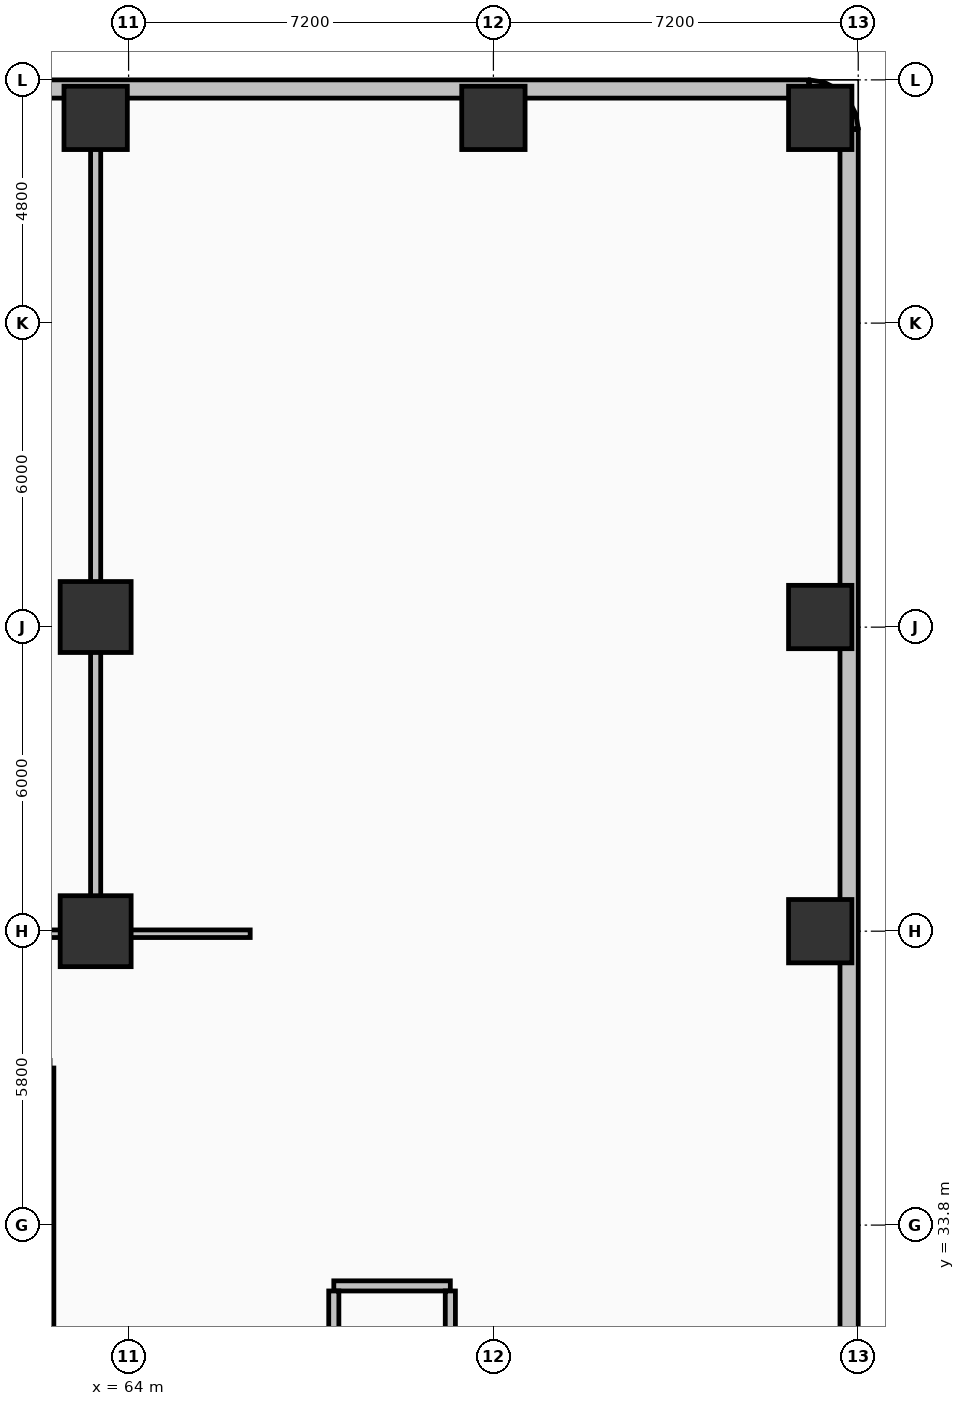
"""IFC4 building model, lengths in metres.
Left out: names, types, materials, properties, quantities, classifications, styles, units other than length and angle.
Written with IfcOpenShell. Run it as: python <this file> out.ifc"""

import sys

from ifc_helpers import new_model, si_unit, direction, frame, frame_2d, origin, origin_2d, place, context, subcontext, project, spatial, rectangle, extrude, element, fill, save


model = new_model("IFC4")
c1 = context("Model", 3, precision=1e-05, world=origin(), true_north=direction((0.0, 1.0)))
c2 = subcontext(c1, "Body", "Model", "MODEL_VIEW")
j1 = project(units=[si_unit("LENGTHUNIT", "METRE"), si_unit("PLANEANGLEUNIT", "RADIAN")], contexts=[c1])
p1 = place(None, origin())
s1 = spatial("IfcSite", under=j1, at=p1, CompositionType="ELEMENT")
p2 = place(p1, origin())
s2 = spatial("IfcBuilding", under=s1, at=p2, CompositionType="ELEMENT")
p3 = place(p2, frame((0.0, 0.0, 11.1)))
s3 = spatial("IfcBuildingStorey", under=s2, at=p3, CompositionType="ELEMENT", Elevation=11.1)
for number, where, z_axis, x_axis in (
    (1, (63.35, 55.65, 0.0), (0.0, 0.0, 1.0), (1.0, 0.0, 0.0)),
    (2, (71.2, 55.65, 0.0), (0.0, 0.0, 1.0), (1.0, 0.0, 0.0)),
    (3, (77.65, 39.6, 0.0), (0.0, 0.0, 1.0), (1.0, 0.0, 0.0)),
    (4, (77.65, 45.8, 0.0), (0.0, 0.0, 1.0), (1.0, 0.0, 0.0)),
    (5, (77.65, 55.65, 0.0), (0.0, 0.0, 1.0), (1.0, 0.0, 0.0)),
):
    element("IfcColumn", number, at=place(p3, frame(where, z_axis=z_axis, x_axis=x_axis)), inside=s3, PredefinedType="COLUMN", context=c2, shape_type="SweptSolid", body=[
        extrude(rectangle(XDim=1.25, YDim=1.25, at=origin_2d()), origin(), (0.0, 0.0, 1.0), 4.5),
    ])
for number, where, z_axis, x_axis in (
    (6, (63.35, 39.6, 0.0), (0.0, 0.0, 1.0), (1.0, 0.0, 0.0)),
    (7, (63.35, 45.8, 0.0), (0.0, 0.0, 1.0), (1.0, 0.0, 0.0)),
):
    element("IfcColumn", number, at=place(p3, frame(where, z_axis=z_axis, x_axis=x_axis)), inside=s3, PredefinedType="COLUMN", context=c2, shape_type="SweptSolid", body=[
        extrude(rectangle(XDim=1.4, YDim=1.4, at=origin_2d()), origin(), (0.0, 0.0, 1.0), 4.5),
    ])
p4 = place(p3, frame((78.22, 0.98, 0.0), z_axis=(0.0, 0.0, 1.0), x_axis=(0.0, 1.0, 0.0)))
e8 = element("IfcWall", 8, at=p4, inside=s3, PredefinedType="SOLIDWALL", context=c2, shape_type="SweptSolid", body=[
    extrude(rectangle(XDim=54.44, YDim=0.36, at=frame_2d((27.22, 0.0))), origin(), (0.0, 0.0, 1.0), 3.48),
])
p5 = place(p4, frame((1.411, 0.0, 0.9)))
e9 = element("IfcOpeningElement", 9, at=p5, cuts=e8, PredefinedType="OPENING", context=c2, shape_type="SweptSolid", body=[
    extrude(rectangle(XDim=1.8, YDim=2.1, at=frame_2d((0.9, 1.05))), frame((0.0, 0.19, 0.0), z_axis=(0.0, -1.0, 0.0), x_axis=(1.0, 0.0, 0.0)), (0.0, 0.0, 1.0), 0.38),
])
p6 = place(p4, frame((4.732, 0.0, 0.9)))
e10 = element("IfcOpeningElement", 10, at=p6, cuts=e8, PredefinedType="OPENING", context=c2, shape_type="SweptSolid", body=[
    extrude(rectangle(XDim=1.8, YDim=2.1, at=frame_2d((0.9, 1.05))), frame((0.0, 0.19, 0.0), z_axis=(0.0, -1.0, 0.0), x_axis=(1.0, 0.0, 0.0)), (0.0, 0.0, 1.0), 0.38),
])
p7 = place(p4, frame((11.375, 0.0, 0.9)))
e11 = element("IfcOpeningElement", 11, at=p7, cuts=e8, PredefinedType="OPENING", context=c2, shape_type="SweptSolid", body=[
    extrude(rectangle(XDim=1.8, YDim=2.1, at=frame_2d((0.9, 1.05))), frame((0.0, 0.19, 0.0), z_axis=(0.0, -1.0, 0.0), x_axis=(1.0, 0.0, 0.0)), (0.0, 0.0, 1.0), 0.38),
])
p8 = place(p4, frame((18.017, 0.0, 0.9)))
e12 = element("IfcOpeningElement", 12, at=p8, cuts=e8, PredefinedType="OPENING", context=c2, shape_type="SweptSolid", body=[
    extrude(rectangle(XDim=1.8, YDim=2.1, at=frame_2d((0.9, 1.05))), frame((0.0, 0.19, 0.0), z_axis=(0.0, -1.0, 0.0), x_axis=(1.0, 0.0, 0.0)), (0.0, 0.0, 1.0), 0.38),
])
p9 = place(p4, frame((21.338, 0.0, 0.9)))
e13 = element("IfcOpeningElement", 13, at=p9, cuts=e8, PredefinedType="OPENING", context=c2, shape_type="SweptSolid", body=[
    extrude(rectangle(XDim=1.8, YDim=2.1, at=frame_2d((0.9, 1.05))), frame((0.0, 0.19, 0.0), z_axis=(0.0, -1.0, 0.0), x_axis=(1.0, 0.0, 0.0)), (0.0, 0.0, 1.0), 0.38),
])
p10 = place(p4, frame((23.959, 0.0, 0.9)))
e14 = element("IfcOpeningElement", 14, at=p10, cuts=e8, PredefinedType="OPENING", context=c2, shape_type="SweptSolid", body=[
    extrude(rectangle(XDim=1.8, YDim=2.1, at=frame_2d((0.9, 1.05))), frame((0.0, 0.19, 0.0), z_axis=(0.0, -1.0, 0.0), x_axis=(1.0, 0.0, 0.0)), (0.0, 0.0, 1.0), 0.38),
])
p11 = place(p4, frame((28.681, 0.0, 0.9)))
e15 = element("IfcOpeningElement", 15, at=p11, cuts=e8, PredefinedType="OPENING", context=c2, shape_type="SweptSolid", body=[
    extrude(rectangle(XDim=1.8, YDim=2.1, at=frame_2d((0.9, 1.05))), frame((0.0, 0.19, 0.0), z_axis=(0.0, -1.0, 0.0), x_axis=(1.0, 0.0, 0.0)), (0.0, 0.0, 1.0), 0.38),
])
p12 = place(p4, frame((31.302, 0.0, 0.9)))
e16 = element("IfcOpeningElement", 16, at=p12, cuts=e8, PredefinedType="OPENING", context=c2, shape_type="SweptSolid", body=[
    extrude(rectangle(XDim=1.8, YDim=2.1, at=frame_2d((0.9, 1.05))), frame((0.0, 0.19, 0.0), z_axis=(0.0, -1.0, 0.0), x_axis=(1.0, 0.0, 0.0)), (0.0, 0.0, 1.0), 0.38),
])
p13 = place(p4, frame((34.623, 0.0, 0.9)))
e17 = element("IfcOpeningElement", 17, at=p13, cuts=e8, PredefinedType="OPENING", context=c2, shape_type="SweptSolid", body=[
    extrude(rectangle(XDim=1.8, YDim=2.1, at=frame_2d((0.9, 1.05))), frame((0.0, 0.19, 0.0), z_axis=(0.0, -1.0, 0.0), x_axis=(1.0, 0.0, 0.0)), (0.0, 0.0, 1.0), 0.38),
])
p14 = place(p4, frame((41.266, 0.0, 0.9)))
e18 = element("IfcOpeningElement", 18, at=p14, cuts=e8, PredefinedType="OPENING", context=c2, shape_type="SweptSolid", body=[
    extrude(rectangle(XDim=1.8, YDim=2.1, at=frame_2d((0.9, 1.05))), frame((0.0, 0.19, 0.0), z_axis=(0.0, -1.0, 0.0), x_axis=(1.0, 0.0, 0.0)), (0.0, 0.0, 1.0), 0.38),
])
p15 = place(p4, frame((47.908, 0.0, 0.9)))
e19 = element("IfcOpeningElement", 19, at=p15, cuts=e8, PredefinedType="OPENING", context=c2, shape_type="SweptSolid", body=[
    extrude(rectangle(XDim=1.8, YDim=2.1, at=frame_2d((0.9, 1.05))), frame((0.0, 0.19, 0.0), z_axis=(0.0, -1.0, 0.0), x_axis=(1.0, 0.0, 0.0)), (0.0, 0.0, 1.0), 0.38),
])
p16 = place(p4, frame((51.229, 0.0, 0.9)))
e20 = element("IfcOpeningElement", 20, at=p16, cuts=e8, PredefinedType="OPENING", context=c2, shape_type="SweptSolid", body=[
    extrude(rectangle(XDim=1.8, YDim=2.1, at=frame_2d((0.9, 1.05))), frame((0.0, 0.19, 0.0), z_axis=(0.0, -1.0, 0.0), x_axis=(1.0, 0.0, 0.0)), (0.0, 0.0, 1.0), 0.38),
])
p17 = place(p3, frame((78.22, 55.42, 0.0), z_axis=(0.0, 0.0, 1.0), x_axis=(-0.156012644899, 0.987755058014, 0.0)))
e21 = element("IfcWall", 21, at=p17, inside=s3, PredefinedType="SOLIDWALL", context=c2, shape_type="SweptSolid", body=[
    extrude(rectangle(XDim=0.25, YDim=0.36, at=frame_2d((0.125, 0.0))), origin(), (0.0, 0.0, 1.0), 3.48),
])
for number, where, z_axis, x_axis in (
    (22, (78.181, 55.667, 0.0), (0.0, 0.0, 1.0), (-0.455, 0.891, 0.0)),
    (23, (78.067, 55.89, 0.0), (0.0, 0.0, 1.0), (-0.707, 0.707, 0.0)),
    (24, (77.89, 56.067, 0.0), (0.0, 0.0, 1.0), (-0.891, 0.455, 0.0)),
):
    element("IfcWall", number, at=place(p3, frame(where, z_axis=z_axis, x_axis=x_axis)), inside=s3, PredefinedType="SOLIDWALL", context=c2, shape_type="SweptSolid", body=[
        extrude(rectangle(XDim=0.25, YDim=0.36, at=frame_2d((0.125, 0.0))), origin(), (0.0, 0.0, 1.0), 3.48),
    ])
p18 = place(p3, frame((77.667, 56.181, 0.0), z_axis=(0.0, 0.0, 1.0), x_axis=(-0.987755058014, 0.156012644899, 0.0)))
e25 = element("IfcWall", 25, at=p18, inside=s3, PredefinedType="SOLIDWALL", context=c2, shape_type="SweptSolid", body=[
    extrude(rectangle(XDim=0.25, YDim=0.36, at=frame_2d((0.125, 0.0))), origin(), (0.0, 0.0, 1.0), 3.48),
])
p19 = place(p3, frame((77.42, 56.22, 0.0), z_axis=(0.0, 0.0, 1.0), x_axis=(-1.0, 0.0, 0.0)))
e26 = element("IfcWall", 26, at=p19, inside=s3, PredefinedType="SOLIDWALL", context=c2, shape_type="SweptSolid", body=[
    extrude(rectangle(XDim=15.25, YDim=0.36, at=frame_2d((7.625, 0.0))), origin(), (0.0, 0.0, 1.0), 3.48),
])
p20 = place(p19, frame((1.494, 0.0, 0.9)))
e27 = element("IfcOpeningElement", 27, at=p20, cuts=e26, PredefinedType="OPENING", context=c2, shape_type="SweptSolid", body=[
    extrude(rectangle(XDim=1.8, YDim=2.1, at=frame_2d((0.9, 1.05))), frame((0.0, 0.19, 0.0), z_axis=(0.0, -1.0, 0.0), x_axis=(1.0, 0.0, 0.0)), (0.0, 0.0, 1.0), 0.38),
])
p21 = place(p19, frame((8.469, 0.0, 0.9)))
e28 = element("IfcOpeningElement", 28, at=p21, cuts=e26, PredefinedType="OPENING", context=c2, shape_type="SweptSolid", body=[
    extrude(rectangle(XDim=1.8, YDim=2.1, at=frame_2d((0.9, 1.05))), frame((0.0, 0.19, 0.0), z_axis=(0.0, -1.0, 0.0), x_axis=(1.0, 0.0, 0.0)), (0.0, 0.0, 1.0), 0.38),
])
p22 = place(p19, frame((10.906, 0.0, 0.9)))
e29 = element("IfcOpeningElement", 29, at=p22, cuts=e26, PredefinedType="OPENING", context=c2, shape_type="SweptSolid", body=[
    extrude(rectangle(XDim=1.8, YDim=2.1, at=frame_2d((0.9, 1.05))), frame((0.0, 0.19, 0.0), z_axis=(0.0, -1.0, 0.0), x_axis=(1.0, 0.0, 0.0)), (0.0, 0.0, 1.0), 0.38),
])
p23 = place(p3, frame((68.05, 32.6, 0.0), z_axis=(0.0, 0.0, 1.0), x_axis=(1.0, 0.0, 0.0)))
e30 = element("IfcWall", 30, at=p23, inside=s3, PredefinedType="PARTITIONING", context=c2, shape_type="SweptSolid", body=[
    extrude(rectangle(XDim=2.3, YDim=0.2, at=frame_2d((1.15, 0.0))), origin(), (0.0, 0.0, 1.0), 3.42),
])
for number, where, z_axis, x_axis in (
    (31, (68.05, 29.9, 0.0), (0.0, 0.0, 1.0), (0.0, 1.0, 0.0)),
    (32, (70.35, 29.9, 0.0), (0.0, 0.0, 1.0), (0.0, 1.0, 0.0)),
):
    element("IfcWall", number, at=place(p3, frame(where, z_axis=z_axis, x_axis=x_axis)), inside=s3, PredefinedType="PARTITIONING", context=c2, shape_type="SweptSolid", body=[
        extrude(rectangle(XDim=2.6, YDim=0.2, at=frame_2d((1.3, 0.0))), origin(), (0.0, 0.0, 1.0), 3.42),
    ])
p24 = place(p3, frame((62.45, 19.5, 0.0), z_axis=(0.0, 0.0, 1.0), x_axis=(0.0, 1.0, 0.0)))
e33 = element("IfcWall", 33, at=p24, inside=s3, PredefinedType="PARTITIONING", context=c2, shape_type="SweptSolid", body=[
    extrude(rectangle(XDim=17.4, YDim=0.15, at=frame_2d((8.7, 0.0))), origin(), (0.0, 0.0, 1.0), 3.42),
])
p25 = place(p3, frame((63.35, 39.6, 0.0), z_axis=(0.0, 0.0, 1.0), x_axis=(0.0, 1.0, 0.0)))
e34 = element("IfcWall", 34, at=p25, inside=s3, PredefinedType="PARTITIONING", context=c2, shape_type="SweptSolid", body=[
    extrude(rectangle(XDim=16.4, YDim=0.2, at=frame_2d((8.2, 0.0))), origin(), (0.0, 0.0, 1.0), 3.42),
])
p26 = place(p25, frame((3.4, 0.0, 0.0)))
e35 = element("IfcOpeningElement", 35, at=p26, cuts=e34, PredefinedType="OPENING", context=c2, shape_type="SweptSolid", body=[
    extrude(rectangle(XDim=1.0, YDim=2.15, at=frame_2d((0.5, 1.075))), frame((0.0, 0.11, 0.0), z_axis=(0.0, -1.0, 0.0), x_axis=(1.0, 0.0, 0.0)), (0.0, 0.0, 1.0), 0.22),
])
p27 = place(p3, frame((66.4, 39.55, 0.0), z_axis=(0.0, 0.0, 1.0), x_axis=(-1.0, 0.0, 0.0)))
e36 = element("IfcWall", 36, at=p27, inside=s3, PredefinedType="PARTITIONING", context=c2, shape_type="SweptSolid", body=[
    extrude(rectangle(XDim=13.25, YDim=0.15, at=frame_2d((6.625, 0.0))), origin(), (0.0, 0.0, 1.0), 3.42),
])
p28 = place(p27, frame((5.5, 0.0, 0.0)))
e37 = element("IfcOpeningElement", 37, at=p28, cuts=e36, PredefinedType="OPENING", context=c2, shape_type="SweptSolid", body=[
    extrude(rectangle(XDim=1.0, YDim=2.15, at=frame_2d((0.5, 1.075))), frame((0.0, 0.085, 0.0), z_axis=(0.0, -1.0, 0.0), x_axis=(1.0, 0.0, 0.0)), (0.0, 0.0, 1.0), 0.17),
])
p29 = place(p12, origin())
e38 = element("IfcWindow", 38, at=p29, inside=s3, PartitioningType="SINGLE_PANEL", PredefinedType="WINDOW", context=c2, shape_type="SweptSolid", body=[
    extrude(rectangle(XDim=1.8, YDim=2.1, at=frame_2d((0.9, 1.05))), frame((0.0, 0.03, 0.0), z_axis=(0.0, -1.0, 0.0), x_axis=(1.0, 0.0, 0.0)), (0.0, 0.0, 1.0), 0.06),
])
fill(e16, e38)
p30 = place(p13, origin())
e39 = element("IfcWindow", 39, at=p30, inside=s3, PartitioningType="SINGLE_PANEL", PredefinedType="WINDOW", context=c2, shape_type="SweptSolid", body=[
    extrude(rectangle(XDim=1.8, YDim=2.1, at=frame_2d((0.9, 1.05))), frame((0.0, 0.03, 0.0), z_axis=(0.0, -1.0, 0.0), x_axis=(1.0, 0.0, 0.0)), (0.0, 0.0, 1.0), 0.06),
])
fill(e17, e39)
p31 = place(p14, origin())
e40 = element("IfcWindow", 40, at=p31, inside=s3, PartitioningType="SINGLE_PANEL", PredefinedType="WINDOW", context=c2, shape_type="SweptSolid", body=[
    extrude(rectangle(XDim=1.8, YDim=2.1, at=frame_2d((0.9, 1.05))), frame((0.0, 0.03, 0.0), z_axis=(0.0, -1.0, 0.0), x_axis=(1.0, 0.0, 0.0)), (0.0, 0.0, 1.0), 0.06),
])
fill(e18, e40)
p32 = place(p15, origin())
e41 = element("IfcWindow", 41, at=p32, inside=s3, PartitioningType="SINGLE_PANEL", PredefinedType="WINDOW", context=c2, shape_type="SweptSolid", body=[
    extrude(rectangle(XDim=1.8, YDim=2.1, at=frame_2d((0.9, 1.05))), frame((0.0, 0.03, 0.0), z_axis=(0.0, -1.0, 0.0), x_axis=(1.0, 0.0, 0.0)), (0.0, 0.0, 1.0), 0.06),
])
fill(e19, e41)
p33 = place(p16, origin())
e42 = element("IfcWindow", 42, at=p33, inside=s3, PartitioningType="SINGLE_PANEL", PredefinedType="WINDOW", context=c2, shape_type="SweptSolid", body=[
    extrude(rectangle(XDim=1.8, YDim=2.1, at=frame_2d((0.9, 1.05))), frame((0.0, 0.03, 0.0), z_axis=(0.0, -1.0, 0.0), x_axis=(1.0, 0.0, 0.0)), (0.0, 0.0, 1.0), 0.06),
])
fill(e20, e42)
p34 = place(p20, origin())
e43 = element("IfcWindow", 43, at=p34, inside=s3, PartitioningType="SINGLE_PANEL", PredefinedType="WINDOW", context=c2, shape_type="SweptSolid", body=[
    extrude(rectangle(XDim=1.8, YDim=2.1, at=frame_2d((0.9, 1.05))), frame((0.0, 0.03, 0.0), z_axis=(0.0, -1.0, 0.0), x_axis=(1.0, 0.0, 0.0)), (0.0, 0.0, 1.0), 0.06),
])
fill(e27, e43)
p35 = place(p21, origin())
e44 = element("IfcWindow", 44, at=p35, inside=s3, PartitioningType="SINGLE_PANEL", PredefinedType="WINDOW", context=c2, shape_type="SweptSolid", body=[
    extrude(rectangle(XDim=1.8, YDim=2.1, at=frame_2d((0.9, 1.05))), frame((0.0, 0.03, 0.0), z_axis=(0.0, -1.0, 0.0), x_axis=(1.0, 0.0, 0.0)), (0.0, 0.0, 1.0), 0.06),
])
fill(e28, e44)
p36 = place(p22, origin())
e45 = element("IfcWindow", 45, at=p36, inside=s3, PartitioningType="SINGLE_PANEL", PredefinedType="WINDOW", context=c2, shape_type="SweptSolid", body=[
    extrude(rectangle(XDim=1.8, YDim=2.1, at=frame_2d((0.9, 1.05))), frame((0.0, 0.03, 0.0), z_axis=(0.0, -1.0, 0.0), x_axis=(1.0, 0.0, 0.0)), (0.0, 0.0, 1.0), 0.06),
])
fill(e29, e45)
p37 = place(p26, origin())
e46 = element("IfcDoor", 46, at=p37, inside=s3, OperationType="SINGLE_SWING_RIGHT", PredefinedType="DOOR", context=c2, shape_type="SweptSolid", body=[
    extrude(rectangle(XDim=1.0, YDim=2.15, at=frame_2d((0.5, 1.075))), frame((0.0, 0.025, 0.0), z_axis=(0.0, -1.0, 0.0), x_axis=(1.0, 0.0, 0.0)), (0.0, 0.0, 1.0), 0.05),
])
fill(e35, e46)
save(model, sys.argv[1])
